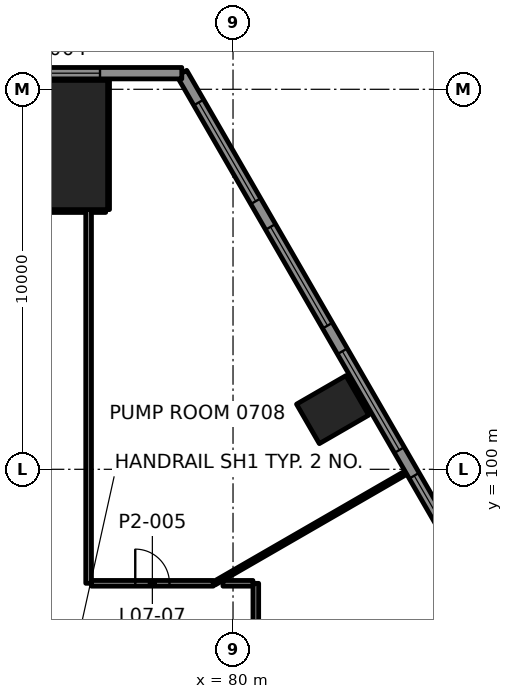
"""IFC4 building model, lengths in metres.
Left out: names, types, materials, properties, quantities, classifications, styles, units other than length and angle.
Written with IfcOpenShell. Run it as: python <this file> out.ifc"""

import sys

from ifc_helpers import new_model, si_unit, direction, frame, frame_2d, origin, origin_2d, place, context, subcontext, project, spatial, rectangle, extrude, element, fill, save


model = new_model("IFC4")
c1 = context("Model", 3, precision=1e-05, world=origin(), true_north=direction((0.0, 1.0)))
c2 = subcontext(c1, "Body", "Model", "MODEL_VIEW")
j1 = project(units=[si_unit("LENGTHUNIT", "METRE"), si_unit("PLANEANGLEUNIT", "RADIAN")], contexts=[c1])
p1 = place(None, origin())
s1 = spatial("IfcSite", under=j1, at=p1, CompositionType="ELEMENT")
p2 = place(p1, origin())
s2 = spatial("IfcBuilding", under=s1, at=p2, CompositionType="ELEMENT")
p3 = place(p2, frame((0.0, 0.0, 35.5)))
s3 = spatial("IfcBuildingStorey", under=s2, at=p3, CompositionType="ELEMENT", Elevation=35.5)
p4 = place(p3, frame((75.0, 108.534, 0.0), z_axis=(0.0, 0.0, 1.0), x_axis=(-1.0, 0.0, 0.0)))
e1 = element("IfcColumn", 1, at=p4, inside=s3, PredefinedType="COLUMN", context=c2, shape_type="SweptSolid", body=[
    extrude(rectangle(XDim=3.4, YDim=3.4, at=origin_2d()), origin(), (0.0, 0.0, 1.0), 4.5),
])
p5 = place(p3, frame((82.621, 101.57, -0.0), z_axis=(0.0, 0.0, 1.0), x_axis=(-0.5, 0.866025403784, 0.0)))
e2 = element("IfcColumn", 2, at=p5, inside=s3, PredefinedType="COLUMN", context=c2, shape_type="SweptSolid", body=[
    extrude(rectangle(XDim=1.2, YDim=1.5, at=origin_2d()), origin(), (0.0, 0.0, 1.0), 4.5),
])
p6 = place(p3, frame((76.275, 97.0, 0.0), z_axis=(0.0, 0.0, 1.0), x_axis=(1.0, 0.0, 0.0)))
e3 = element("IfcWall", 3, at=p6, inside=s3, PredefinedType="PARTITIONING", context=c2, shape_type="SweptSolid", body=[
    extrude(rectangle(XDim=3.205, YDim=0.15, at=frame_2d((1.603, 0.0))), origin(), (0.0, 0.0, 1.0), 3.7),
])
p7 = place(p6, frame((1.153, 0.0, 0.0)))
e4 = element("IfcOpeningElement", 4, at=p7, cuts=e3, PredefinedType="OPENING", context=c2, shape_type="SweptSolid", body=[
    extrude(rectangle(XDim=0.9, YDim=2.1, at=frame_2d((0.45, 1.05))), frame((0.0, 0.085, 0.0), z_axis=(0.0, -1.0, 0.0), x_axis=(1.0, 0.0, 0.0)), (0.0, 0.0, 1.0), 0.17),
])
p8 = place(p3, frame((73.875, 106.834, 0.0), z_axis=(0.0, 0.0, 1.0), x_axis=(1.0, 0.0, 0.0)))
e5 = element("IfcWall", 5, at=p8, inside=s3, PredefinedType="PARTITIONING", context=c2, shape_type="SweptSolid", body=[
    extrude(rectangle(XDim=2.25, YDim=0.15, at=frame_2d((1.125, 0.0))), origin(), (0.0, 0.0, 1.0), 3.697),
])
p9 = place(p3, frame((79.505, 97.0, 0.0), z_axis=(0.0, 0.0, 1.0), x_axis=(0.866009767966, 0.500027081053, 0.0)))
e6 = element("IfcWall", 6, at=p9, inside=s3, PredefinedType="PARTITIONING", context=c2, shape_type="SweptSolid", body=[
    extrude(rectangle(XDim=5.943, YDim=0.1, at=frame_2d((2.972, 0.0))), origin(), (0.0, 0.0, 1.0), 3.465),
])
p10 = place(p3, frame((80.6, 86.4, 0.0), z_axis=(0.0, 0.0, 1.0), x_axis=(0.0, 1.0, 0.0)))
e7 = element("IfcWall", 7, at=p10, inside=s3, PredefinedType="PARTITIONING", context=c2, shape_type="SweptSolid", body=[
    extrude(rectangle(XDim=10.6, YDim=0.15, at=frame_2d((5.3, 0.0))), origin(), (0.0, 0.0, 1.0), 3.7),
])
p11 = place(p3, frame((76.7, 106.834, 0.0), z_axis=(0.0, 0.0, 1.0), x_axis=(0.0, 1.0, 0.0)))
e8 = element("IfcWall", 8, at=p11, inside=s3, PredefinedType="PARTITIONING", context=c2, shape_type="SweptSolid", body=[
    extrude(rectangle(XDim=3.56, YDim=0.1, at=frame_2d((1.78, 0.0))), origin(), (0.0, 0.0, 1.0), 3.7),
])
p12 = place(p3, frame((76.2, 97.0, 0.0), z_axis=(0.0, 0.0, 1.0), x_axis=(0.0, 1.0, 0.0)))
e9 = element("IfcWall", 9, at=p12, inside=s3, PredefinedType="PARTITIONING", context=c2, shape_type="SweptSolid", body=[
    extrude(rectangle(XDim=9.834, YDim=0.15, at=frame_2d((4.917, 0.0))), origin(), (0.0, 0.0, 1.0), 3.7),
])
p13 = place(p3, frame((79.735, 97.0, 0.0), z_axis=(0.0, 0.0, 1.0), x_axis=(1.0, 0.0, 0.0)))
e10 = element("IfcWall", 10, at=p13, inside=s3, PredefinedType="PARTITIONING", context=c2, shape_type="SweptSolid", body=[
    extrude(rectangle(XDim=0.79, YDim=0.15, at=frame_2d((0.395, 0.0))), origin(), (0.0, 0.0, 1.0), 3.7),
])
p14 = place(p3, frame((76.275, 106.834, 0.0), z_axis=(0.0, 0.0, 1.0), x_axis=(1.0, 0.0, 0.0)))
e11 = element("IfcWall", 11, at=p14, inside=s3, PredefinedType="PARTITIONING", context=c2, shape_type="SweptSolid", body=[
    extrude(rectangle(XDim=0.375, YDim=0.15, at=frame_2d((0.187, 0.0))), origin(), (0.0, 0.0, 1.0), 3.7),
])
p15 = place(p3, frame((107.504, 60.451, 0.0), z_axis=(0.0, 0.0, 1.0), x_axis=(-0.500000550228, 0.86602508611, 0.0)))
e12 = element("IfcWall", 12, at=p15, inside=s3, PredefinedType="SOLIDWALL", context=c2, shape_type="SweptSolid", body=[
    extrude(rectangle(XDim=57.704, YDim=0.3, at=frame_2d((28.852, 0.0))), origin(), (0.0, 0.0, 1.0), 4.3),
])
p16 = place(p15, frame((0.89, 0.0, 0.8)))
e13 = element("IfcOpeningElement", 13, at=p16, cuts=e12, PredefinedType="OPENING", context=c2, shape_type="SweptSolid", body=[
    extrude(rectangle(XDim=3.0, YDim=2.4, at=frame_2d((1.5, 1.2))), frame((0.0, 0.16, 0.0), z_axis=(0.0, -1.0, 0.0), x_axis=(1.0, 0.0, 0.0)), (0.0, 0.0, 1.0), 0.32),
])
p17 = place(p15, frame((4.67, 0.0, 0.8)))
e14 = element("IfcOpeningElement", 14, at=p17, cuts=e12, PredefinedType="OPENING", context=c2, shape_type="SweptSolid", body=[
    extrude(rectangle(XDim=3.0, YDim=2.4, at=frame_2d((1.5, 1.2))), frame((0.0, 0.16, 0.0), z_axis=(0.0, -1.0, 0.0), x_axis=(1.0, 0.0, 0.0)), (0.0, 0.0, 1.0), 0.32),
])
p18 = place(p15, frame((8.451, 0.0, 0.8)))
e15 = element("IfcOpeningElement", 15, at=p18, cuts=e12, PredefinedType="OPENING", context=c2, shape_type="SweptSolid", body=[
    extrude(rectangle(XDim=3.0, YDim=2.4, at=frame_2d((1.5, 1.2))), frame((0.0, 0.16, 0.0), z_axis=(0.0, -1.0, 0.0), x_axis=(1.0, 0.0, 0.0)), (0.0, 0.0, 1.0), 0.32),
])
p19 = place(p15, frame((12.231, 0.0, 0.8)))
e16 = element("IfcOpeningElement", 16, at=p19, cuts=e12, PredefinedType="OPENING", context=c2, shape_type="SweptSolid", body=[
    extrude(rectangle(XDim=3.0, YDim=2.4, at=frame_2d((1.5, 1.2))), frame((0.0, 0.16, 0.0), z_axis=(0.0, -1.0, 0.0), x_axis=(1.0, 0.0, 0.0)), (0.0, 0.0, 1.0), 0.32),
])
p20 = place(p15, frame((16.011, 0.0, 0.8)))
e17 = element("IfcOpeningElement", 17, at=p20, cuts=e12, PredefinedType="OPENING", context=c2, shape_type="SweptSolid", body=[
    extrude(rectangle(XDim=3.0, YDim=2.4, at=frame_2d((1.5, 1.2))), frame((0.0, 0.16, 0.0), z_axis=(0.0, -1.0, 0.0), x_axis=(1.0, 0.0, 0.0)), (0.0, 0.0, 1.0), 0.32),
])
p21 = place(p15, frame((19.792, 0.0, 0.8)))
e18 = element("IfcOpeningElement", 18, at=p21, cuts=e12, PredefinedType="OPENING", context=c2, shape_type="SweptSolid", body=[
    extrude(rectangle(XDim=3.0, YDim=2.4, at=frame_2d((1.5, 1.2))), frame((0.0, 0.16, 0.0), z_axis=(0.0, -1.0, 0.0), x_axis=(1.0, 0.0, 0.0)), (0.0, 0.0, 1.0), 0.32),
])
p22 = place(p15, frame((23.572, 0.0, 0.8)))
e19 = element("IfcOpeningElement", 19, at=p22, cuts=e12, PredefinedType="OPENING", context=c2, shape_type="SweptSolid", body=[
    extrude(rectangle(XDim=3.0, YDim=2.4, at=frame_2d((1.5, 1.2))), frame((0.0, 0.16, 0.0), z_axis=(0.0, -1.0, 0.0), x_axis=(1.0, 0.0, 0.0)), (0.0, 0.0, 1.0), 0.32),
])
p23 = place(p15, frame((27.352, 0.0, 0.8)))
e20 = element("IfcOpeningElement", 20, at=p23, cuts=e12, PredefinedType="OPENING", context=c2, shape_type="SweptSolid", body=[
    extrude(rectangle(XDim=3.0, YDim=2.4, at=frame_2d((1.5, 1.2))), frame((0.0, 0.16, 0.0), z_axis=(0.0, -1.0, 0.0), x_axis=(1.0, 0.0, 0.0)), (0.0, 0.0, 1.0), 0.32),
])
p24 = place(p15, frame((31.132, 0.0, 0.8)))
e21 = element("IfcOpeningElement", 21, at=p24, cuts=e12, PredefinedType="OPENING", context=c2, shape_type="SweptSolid", body=[
    extrude(rectangle(XDim=3.0, YDim=2.4, at=frame_2d((1.5, 1.2))), frame((0.0, 0.16, 0.0), z_axis=(0.0, -1.0, 0.0), x_axis=(1.0, 0.0, 0.0)), (0.0, 0.0, 1.0), 0.32),
])
p25 = place(p15, frame((34.913, 0.0, 0.8)))
e22 = element("IfcOpeningElement", 22, at=p25, cuts=e12, PredefinedType="OPENING", context=c2, shape_type="SweptSolid", body=[
    extrude(rectangle(XDim=3.0, YDim=2.4, at=frame_2d((1.5, 1.2))), frame((0.0, 0.16, 0.0), z_axis=(0.0, -1.0, 0.0), x_axis=(1.0, 0.0, 0.0)), (0.0, 0.0, 1.0), 0.32),
])
p26 = place(p15, frame((38.693, 0.0, 0.8)))
e23 = element("IfcOpeningElement", 23, at=p26, cuts=e12, PredefinedType="OPENING", context=c2, shape_type="SweptSolid", body=[
    extrude(rectangle(XDim=3.0, YDim=2.4, at=frame_2d((1.5, 1.2))), frame((0.0, 0.16, 0.0), z_axis=(0.0, -1.0, 0.0), x_axis=(1.0, 0.0, 0.0)), (0.0, 0.0, 1.0), 0.32),
])
p27 = place(p15, frame((42.473, 0.0, 0.8)))
e24 = element("IfcOpeningElement", 24, at=p27, cuts=e12, PredefinedType="OPENING", context=c2, shape_type="SweptSolid", body=[
    extrude(rectangle(XDim=3.0, YDim=2.4, at=frame_2d((1.5, 1.2))), frame((0.0, 0.16, 0.0), z_axis=(0.0, -1.0, 0.0), x_axis=(1.0, 0.0, 0.0)), (0.0, 0.0, 1.0), 0.32),
])
p28 = place(p15, frame((46.253, 0.0, 0.8)))
e25 = element("IfcOpeningElement", 25, at=p28, cuts=e12, PredefinedType="OPENING", context=c2, shape_type="SweptSolid", body=[
    extrude(rectangle(XDim=3.0, YDim=2.4, at=frame_2d((1.5, 1.2))), frame((0.0, 0.16, 0.0), z_axis=(0.0, -1.0, 0.0), x_axis=(1.0, 0.0, 0.0)), (0.0, 0.0, 1.0), 0.32),
])
p29 = place(p15, frame((50.033, 0.0, 0.8)))
e26 = element("IfcOpeningElement", 26, at=p29, cuts=e12, PredefinedType="OPENING", context=c2, shape_type="SweptSolid", body=[
    extrude(rectangle(XDim=3.0, YDim=2.4, at=frame_2d((1.5, 1.2))), frame((0.0, 0.16, 0.0), z_axis=(0.0, -1.0, 0.0), x_axis=(1.0, 0.0, 0.0)), (0.0, 0.0, 1.0), 0.32),
])
p30 = place(p15, frame((53.814, 0.0, 0.8)))
e27 = element("IfcOpeningElement", 27, at=p30, cuts=e12, PredefinedType="OPENING", context=c2, shape_type="SweptSolid", body=[
    extrude(rectangle(XDim=3.0, YDim=2.4, at=frame_2d((1.5, 1.2))), frame((0.0, 0.16, 0.0), z_axis=(0.0, -1.0, 0.0), x_axis=(1.0, 0.0, 0.0)), (0.0, 0.0, 1.0), 0.32),
])
p31 = place(p3, frame((78.652, 110.424, 0.0), z_axis=(0.0, 0.0, 1.0), x_axis=(-1.0, 0.0, 0.0)))
e28 = element("IfcWall", 28, at=p31, inside=s3, PredefinedType="SOLIDWALL", context=c2, shape_type="SweptSolid", body=[
    extrude(rectangle(XDim=7.304, YDim=0.3, at=frame_2d((3.652, 0.0))), origin(), (0.0, 0.0, 1.0), 4.3),
])
p32 = place(p31, frame((2.152, 0.0, 0.8)))
e29 = element("IfcOpeningElement", 29, at=p32, cuts=e28, PredefinedType="OPENING", context=c2, shape_type="SweptSolid", body=[
    extrude(rectangle(XDim=3.0, YDim=2.4, at=frame_2d((1.5, 1.2))), frame((0.0, 0.16, 0.0), z_axis=(0.0, -1.0, 0.0), x_axis=(1.0, 0.0, 0.0)), (0.0, 0.0, 1.0), 0.32),
])
p33 = place(p7, origin())
e30 = element("IfcDoor", 30, at=p33, inside=s3, OperationType="SINGLE_SWING_LEFT", PredefinedType="DOOR", context=c2, shape_type="SweptSolid", body=[
    extrude(rectangle(XDim=0.9, YDim=2.1, at=frame_2d((0.45, 1.05))), frame((0.0, 0.025, 0.0), z_axis=(0.0, -1.0, 0.0), x_axis=(1.0, 0.0, 0.0)), (0.0, 0.0, 1.0), 0.05),
])
fill(e4, e30)
p34 = place(p27, origin())
e31 = element("IfcWindow", 31, at=p34, inside=s3, PartitioningType="SINGLE_PANEL", PredefinedType="WINDOW", context=c2, shape_type="SweptSolid", body=[
    extrude(rectangle(XDim=3.0, YDim=2.4, at=frame_2d((1.5, 1.2))), frame((0.0, 0.03, 0.0), z_axis=(0.0, -1.0, 0.0), x_axis=(1.0, 0.0, 0.0)), (0.0, 0.0, 1.0), 0.06),
])
fill(e24, e31)
p35 = place(p28, origin())
e32 = element("IfcWindow", 32, at=p35, inside=s3, PartitioningType="SINGLE_PANEL", PredefinedType="WINDOW", context=c2, shape_type="SweptSolid", body=[
    extrude(rectangle(XDim=3.0, YDim=2.4, at=frame_2d((1.5, 1.2))), frame((0.0, 0.03, 0.0), z_axis=(0.0, -1.0, 0.0), x_axis=(1.0, 0.0, 0.0)), (0.0, 0.0, 1.0), 0.06),
])
fill(e25, e32)
p36 = place(p29, origin())
e33 = element("IfcWindow", 33, at=p36, inside=s3, PartitioningType="SINGLE_PANEL", PredefinedType="WINDOW", context=c2, shape_type="SweptSolid", body=[
    extrude(rectangle(XDim=3.0, YDim=2.4, at=frame_2d((1.5, 1.2))), frame((0.0, 0.03, 0.0), z_axis=(0.0, -1.0, 0.0), x_axis=(1.0, 0.0, 0.0)), (0.0, 0.0, 1.0), 0.06),
])
fill(e26, e33)
p37 = place(p30, origin())
e34 = element("IfcWindow", 34, at=p37, inside=s3, PartitioningType="SINGLE_PANEL", PredefinedType="WINDOW", context=c2, shape_type="SweptSolid", body=[
    extrude(rectangle(XDim=3.0, YDim=2.4, at=frame_2d((1.5, 1.2))), frame((0.0, 0.03, 0.0), z_axis=(0.0, -1.0, 0.0), x_axis=(1.0, 0.0, 0.0)), (0.0, 0.0, 1.0), 0.06),
])
fill(e27, e34)
p38 = place(p32, origin())
e35 = element("IfcWindow", 35, at=p38, inside=s3, PartitioningType="SINGLE_PANEL", PredefinedType="WINDOW", context=c2, shape_type="SweptSolid", body=[
    extrude(rectangle(XDim=3.0, YDim=2.4, at=frame_2d((1.5, 1.2))), frame((0.0, 0.03, 0.0), z_axis=(0.0, -1.0, 0.0), x_axis=(1.0, 0.0, 0.0)), (0.0, 0.0, 1.0), 0.06),
])
fill(e29, e35)
save(model, sys.argv[1])
